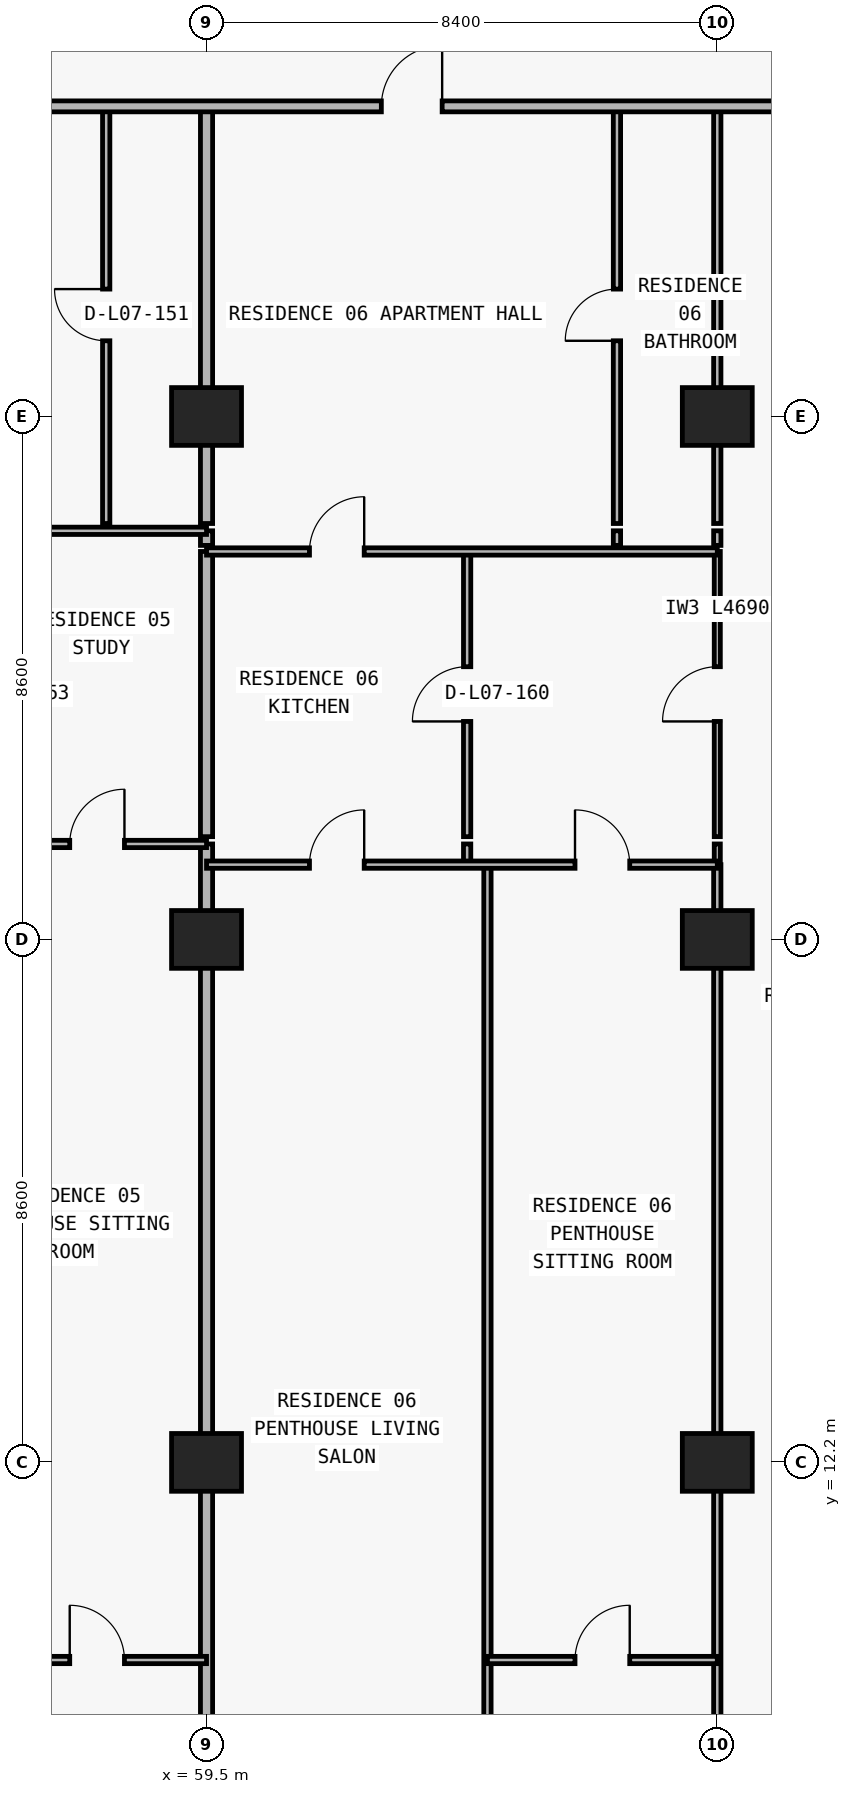
"""IFC4 building model, lengths in metres.
Left out: names, types, materials, properties, quantities, classifications, styles, units other than length and angle.
Written with IfcOpenShell. Run it as: python <this file> out.ifc"""

import sys

from ifc_helpers import new_model, si_unit, direction, frame, frame_2d, origin, origin_2d, place, context, subcontext, project, spatial, rectangle, extrude, element, fill, save


model = new_model("IFC4")
c1 = context("Model", 3, precision=1e-05, world=origin(), true_north=direction((0.0, 1.0)))
c2 = subcontext(c1, "Body", "Model", "MODEL_VIEW")
j1 = project(units=[si_unit("LENGTHUNIT", "METRE"), si_unit("PLANEANGLEUNIT", "RADIAN")], contexts=[c1])
p1 = place(None, origin())
s1 = spatial("IfcSite", under=j1, at=p1, CompositionType="ELEMENT")
p2 = place(p1, origin())
s2 = spatial("IfcBuilding", under=s1, at=p2, CompositionType="ELEMENT")
p3 = place(p2, frame((0.0, 0.0, 33.3)))
s3 = spatial("IfcBuildingStorey", under=s2, at=p3, CompositionType="ELEMENT", Elevation=33.3)
for number, where, z_axis, x_axis in (
    (1, (59.5, 12.2, 0.0), (0.0, 0.0, 1.0), (1.0, 0.0, 0.0)),
    (2, (67.9, 12.2, 0.0), (0.0, 0.0, 1.0), (1.0, 0.0, 0.0)),
    (3, (59.5, 20.8, 0.0), (0.0, 0.0, 1.0), (1.0, 0.0, 0.0)),
    (4, (67.9, 20.8, 0.0), (0.0, 0.0, 1.0), (1.0, 0.0, 0.0)),
    (5, (59.5, 29.4, 0.0), (0.0, 0.0, 1.0), (1.0, 0.0, 0.0)),
    (6, (67.9, 29.4, 0.0), (0.0, 0.0, 1.0), (1.0, 0.0, 0.0)),
):
    element("IfcColumn", number, at=place(p3, frame(where, z_axis=z_axis, x_axis=x_axis)), inside=s3, PredefinedType="COLUMN", context=c2, shape_type="SweptSolid", body=[
        extrude(rectangle(XDim=1.15, YDim=0.95, at=origin_2d()), origin(), (0.0, 0.0, 1.0), 3.05),
    ])
p4 = place(p3, frame((57.85, 27.64, 0.0), z_axis=(0.0, 0.0, 1.0), x_axis=(0.0, 1.0, 0.0)))
e7 = element("IfcWall", 7, at=p4, inside=s3, PredefinedType="PARTITIONING", context=c2, shape_type="SweptSolid", body=[
    extrude(rectangle(XDim=6.86, YDim=0.12, at=frame_2d((3.43, 0.0))), origin(), (0.0, 0.0, 1.0), 3.05),
])
p5 = place(p4, frame((3.005, 0.0, 0.0)))
e8 = element("IfcOpeningElement", 8, at=p5, cuts=e7, PredefinedType="OPENING", context=c2, shape_type="SweptSolid", body=[
    extrude(rectangle(XDim=0.85, YDim=2.1, at=frame_2d((0.425, 1.05))), frame((0.0, 0.07, 0.0), z_axis=(0.0, -1.0, 0.0), x_axis=(1.0, 0.0, 0.0)), (0.0, 0.0, 1.0), 0.14),
])
p6 = place(p3, frame((59.5, 6.24, 0.0), z_axis=(0.0, 0.0, 1.0), x_axis=(0.0, 1.0, 0.0)))
e9 = element("IfcWall", 9, at=p6, inside=s3, PredefinedType="PARTITIONING", context=c2, shape_type="SweptSolid", body=[
    extrude(rectangle(XDim=16.13, YDim=0.2, at=frame_2d((8.065, 0.0))), origin(), (0.0, 0.0, 1.0), 2.11),
])
p7 = place(p3, frame((59.5, 22.49, 0.0), z_axis=(0.0, 0.0, 1.0), x_axis=(0.0, 1.0, 0.0)))
e10 = element("IfcWall", 10, at=p7, inside=s3, PredefinedType="PARTITIONING", context=c2, shape_type="SweptSolid", body=[
    extrude(rectangle(XDim=4.69, YDim=0.2, at=frame_2d((2.345, 0.0))), origin(), (0.0, 0.0, 1.0), 2.11),
])
p8 = place(p3, frame((59.5, 27.28, 0.0), z_axis=(0.0, 0.0, 1.0), x_axis=(0.0, 1.0, 0.0)))
e11 = element("IfcWall", 11, at=p8, inside=s3, PredefinedType="PARTITIONING", context=c2, shape_type="SweptSolid", body=[
    extrude(rectangle(XDim=0.24, YDim=0.2, at=frame_2d((0.12, 0.0))), origin(), (0.0, 0.0, 1.0), 2.11),
])
p9 = place(p3, frame((59.5, 27.64, 0.0), z_axis=(0.0, 0.0, 1.0), x_axis=(0.0, 1.0, 0.0)))
e12 = element("IfcWall", 12, at=p9, inside=s3, PredefinedType="PARTITIONING", context=c2, shape_type="SweptSolid", body=[
    extrude(rectangle(XDim=6.86, YDim=0.2, at=frame_2d((3.43, 0.0))), origin(), (0.0, 0.0, 1.0), 2.11),
])
p10 = place(p3, frame((63.786, 22.03, 0.0), z_axis=(0.0, 0.0, 1.0), x_axis=(0.0, 1.0, 0.0)))
e13 = element("IfcWall", 13, at=p10, inside=s3, PredefinedType="PARTITIONING", context=c2, shape_type="SweptSolid", body=[
    extrude(rectangle(XDim=0.34, YDim=0.12, at=frame_2d((0.17, 0.0))), origin(), (0.0, 0.0, 1.0), 3.05),
])
p11 = place(p3, frame((63.786, 22.49, 0.0), z_axis=(0.0, 0.0, 1.0), x_axis=(0.0, 1.0, 0.0)))
e14 = element("IfcWall", 14, at=p11, inside=s3, PredefinedType="PARTITIONING", context=c2, shape_type="SweptSolid", body=[
    extrude(rectangle(XDim=4.69, YDim=0.12, at=frame_2d((2.345, 0.0))), origin(), (0.0, 0.0, 1.0), 3.05),
])
p12 = place(p11, frame((1.895, 0.0, 0.0)))
e15 = element("IfcOpeningElement", 15, at=p12, cuts=e14, PredefinedType="OPENING", context=c2, shape_type="SweptSolid", body=[
    extrude(rectangle(XDim=0.9, YDim=2.15, at=frame_2d((0.45, 1.075))), frame((0.0, 0.07, 0.0), z_axis=(0.0, -1.0, 0.0), x_axis=(1.0, 0.0, 0.0)), (0.0, 0.0, 1.0), 0.14),
])
p13 = place(p3, frame((64.12, 6.24, 0.0), z_axis=(0.0, 0.0, 1.0), x_axis=(0.0, 1.0, 0.0)))
e16 = element("IfcWall", 16, at=p13, inside=s3, PredefinedType="PARTITIONING", context=c2, shape_type="SweptSolid", body=[
    extrude(rectangle(XDim=15.79, YDim=0.12, at=frame_2d((7.895, 0.0))), origin(), (0.0, 0.0, 1.0), 3.05),
])
p14 = place(p3, frame((66.25, 27.28, 0.0), z_axis=(0.0, 0.0, 1.0), x_axis=(0.0, 1.0, 0.0)))
e17 = element("IfcWall", 17, at=p14, inside=s3, PredefinedType="PARTITIONING", context=c2, shape_type="SweptSolid", body=[
    extrude(rectangle(XDim=0.24, YDim=0.12, at=frame_2d((0.12, 0.0))), origin(), (0.0, 0.0, 1.0), 3.05),
])
p15 = place(p3, frame((66.25, 27.64, 0.0), z_axis=(0.0, 0.0, 1.0), x_axis=(0.0, 1.0, 0.0)))
e18 = element("IfcWall", 18, at=p15, inside=s3, PredefinedType="PARTITIONING", context=c2, shape_type="SweptSolid", body=[
    extrude(rectangle(XDim=6.86, YDim=0.12, at=frame_2d((3.43, 0.0))), origin(), (0.0, 0.0, 1.0), 3.05),
])
p16 = place(p15, frame((3.005, 0.0, 0.0)))
e19 = element("IfcOpeningElement", 19, at=p16, cuts=e18, PredefinedType="OPENING", context=c2, shape_type="SweptSolid", body=[
    extrude(rectangle(XDim=0.85, YDim=2.1, at=frame_2d((0.425, 1.05))), frame((0.0, 0.07, 0.0), z_axis=(0.0, -1.0, 0.0), x_axis=(1.0, 0.0, 0.0)), (0.0, 0.0, 1.0), 0.14),
])
p17 = place(p3, frame((67.9, 6.24, 0.0), z_axis=(0.0, 0.0, 1.0), x_axis=(0.0, 1.0, 0.0)))
e20 = element("IfcWall", 20, at=p17, inside=s3, PredefinedType="PARTITIONING", context=c2, shape_type="SweptSolid", body=[
    extrude(rectangle(XDim=15.79, YDim=0.12, at=frame_2d((7.895, 0.0))), origin(), (0.0, 0.0, 1.0), 2.11),
])
p18 = place(p3, frame((67.9, 22.035, 0.0), z_axis=(0.0, 0.0, 1.0), x_axis=(0.0, 1.0, 0.0)))
e21 = element("IfcWall", 21, at=p18, inside=s3, PredefinedType="MOVABLE", context=c2, shape_type="SweptSolid", body=[
    extrude(rectangle(XDim=0.335, YDim=0.1, at=frame_2d((0.167, 0.0))), origin(), (0.0, 0.0, 1.0), 2.11),
])
p19 = place(p3, frame((67.9, 22.49, 0.0), z_axis=(0.0, 0.0, 1.0), x_axis=(0.0, 1.0, 0.0)))
e22 = element("IfcWall", 22, at=p19, inside=s3, PredefinedType="MOVABLE", context=c2, shape_type="SweptSolid", body=[
    extrude(rectangle(XDim=4.69, YDim=0.1, at=frame_2d((2.345, 0.0))), origin(), (0.0, 0.0, 1.0), 2.11),
])
p20 = place(p19, frame((1.895, 0.0, 0.0)))
e23 = element("IfcOpeningElement", 23, at=p20, cuts=e22, PredefinedType="OPENING", context=c2, shape_type="SweptSolid", body=[
    extrude(rectangle(XDim=0.9, YDim=2.06, at=frame_2d((0.45, 1.03))), frame((0.0, 0.06, 0.0), z_axis=(0.0, -1.0, 0.0), x_axis=(1.0, 0.0, 0.0)), (0.0, 0.0, 1.0), 0.12),
])
p21 = place(p3, frame((67.9, 27.28, 0.0), z_axis=(0.0, 0.0, 1.0), x_axis=(0.0, 1.0, 0.0)))
e24 = element("IfcWall", 24, at=p21, inside=s3, PredefinedType="PARTITIONING", context=c2, shape_type="SweptSolid", body=[
    extrude(rectangle(XDim=0.24, YDim=0.12, at=frame_2d((0.12, 0.0))), origin(), (0.0, 0.0, 1.0), 2.11),
])
p22 = place(p3, frame((67.9, 27.64, 0.0), z_axis=(0.0, 0.0, 1.0), x_axis=(0.0, 1.0, 0.0)))
e25 = element("IfcWall", 25, at=p22, inside=s3, PredefinedType="PARTITIONING", context=c2, shape_type="SweptSolid", body=[
    extrude(rectangle(XDim=6.86, YDim=0.12, at=frame_2d((3.43, 0.0))), origin(), (0.0, 0.0, 1.0), 2.11),
])
p23 = place(p3, frame((55.9, 8.95, 0.0), z_axis=(0.0, 0.0, 1.0), x_axis=(1.0, 0.0, 0.0)))
e26 = element("IfcWall", 26, at=p23, inside=s3, PredefinedType="PARTITIONING", context=c2, shape_type="SweptSolid", body=[
    extrude(rectangle(XDim=3.6, YDim=0.12, at=frame_2d((1.8, 0.0))), origin(), (0.0, 0.0, 1.0), 3.05),
])
p24 = place(p23, frame((1.35, 0.0, 0.0)))
e27 = element("IfcOpeningElement", 27, at=p24, cuts=e26, PredefinedType="OPENING", context=c2, shape_type="SweptSolid", body=[
    extrude(rectangle(XDim=0.9, YDim=2.15, at=frame_2d((0.45, 1.075))), frame((0.0, 0.07, 0.0), z_axis=(0.0, -1.0, 0.0), x_axis=(1.0, 0.0, 0.0)), (0.0, 0.0, 1.0), 0.14),
])
p25 = place(p3, frame((64.12, 8.95, 0.0), z_axis=(0.0, 0.0, 1.0), x_axis=(1.0, 0.0, 0.0)))
e28 = element("IfcWall", 28, at=p25, inside=s3, PredefinedType="PARTITIONING", context=c2, shape_type="SweptSolid", body=[
    extrude(rectangle(XDim=3.78, YDim=0.12, at=frame_2d((1.89, 0.0))), origin(), (0.0, 0.0, 1.0), 3.05),
])
p26 = place(p25, frame((1.44, 0.0, 0.0)))
e29 = element("IfcOpeningElement", 29, at=p26, cuts=e28, PredefinedType="OPENING", context=c2, shape_type="SweptSolid", body=[
    extrude(rectangle(XDim=0.9, YDim=2.15, at=frame_2d((0.45, 1.075))), frame((0.0, 0.07, 0.0), z_axis=(0.0, -1.0, 0.0), x_axis=(1.0, 0.0, 0.0)), (0.0, 0.0, 1.0), 0.14),
])
p27 = place(p3, frame((59.5, 22.03, 0.0), z_axis=(0.0, 0.0, 1.0), x_axis=(1.0, 0.0, 0.0)))
e30 = element("IfcWall", 30, at=p27, inside=s3, PredefinedType="PARTITIONING", context=c2, shape_type="SweptSolid", body=[
    extrude(rectangle(XDim=8.4, YDim=0.12, at=frame_2d((4.2, 0.0))), origin(), (0.0, 0.0, 1.0), 3.05),
])
p28 = place(p27, frame((1.693, 0.0, 0.0)))
e31 = element("IfcOpeningElement", 31, at=p28, cuts=e30, PredefinedType="OPENING", context=c2, shape_type="SweptSolid", body=[
    extrude(rectangle(XDim=0.9, YDim=2.15, at=frame_2d((0.45, 1.075))), frame((0.0, 0.07, 0.0), z_axis=(0.0, -1.0, 0.0), x_axis=(1.0, 0.0, 0.0)), (0.0, 0.0, 1.0), 0.14),
])
p29 = place(p27, frame((6.06, 0.0, 0.0)))
e32 = element("IfcOpeningElement", 32, at=p29, cuts=e30, PredefinedType="OPENING", context=c2, shape_type="SweptSolid", body=[
    extrude(rectangle(XDim=0.9, YDim=2.15, at=frame_2d((0.45, 1.075))), frame((0.0, 0.07, 0.0), z_axis=(0.0, -1.0, 0.0), x_axis=(1.0, 0.0, 0.0)), (0.0, 0.0, 1.0), 0.14),
])
p30 = place(p3, frame((55.9, 22.37, 0.0), z_axis=(0.0, 0.0, 1.0), x_axis=(1.0, 0.0, 0.0)))
e33 = element("IfcWall", 33, at=p30, inside=s3, PredefinedType="PARTITIONING", context=c2, shape_type="SweptSolid", body=[
    extrude(rectangle(XDim=3.6, YDim=0.12, at=frame_2d((1.8, 0.0))), origin(), (0.0, 0.0, 1.0), 3.05),
])
p31 = place(p30, frame((1.35, 0.0, 0.0)))
e34 = element("IfcOpeningElement", 34, at=p31, cuts=e33, PredefinedType="OPENING", context=c2, shape_type="SweptSolid", body=[
    extrude(rectangle(XDim=0.9, YDim=2.15, at=frame_2d((0.45, 1.075))), frame((0.0, 0.07, 0.0), z_axis=(0.0, -1.0, 0.0), x_axis=(1.0, 0.0, 0.0)), (0.0, 0.0, 1.0), 0.14),
])
p32 = place(p3, frame((59.5, 27.18, 0.0), z_axis=(0.0, 0.0, 1.0), x_axis=(1.0, 0.0, 0.0)))
e35 = element("IfcWall", 35, at=p32, inside=s3, PredefinedType="PARTITIONING", context=c2, shape_type="SweptSolid", body=[
    extrude(rectangle(XDim=8.4, YDim=0.12, at=frame_2d((4.2, 0.0))), origin(), (0.0, 0.0, 1.0), 3.05),
])
p33 = place(p32, frame((1.693, 0.0, 0.0)))
e36 = element("IfcOpeningElement", 36, at=p33, cuts=e35, PredefinedType="OPENING", context=c2, shape_type="SweptSolid", body=[
    extrude(rectangle(XDim=0.9, YDim=2.15, at=frame_2d((0.45, 1.075))), frame((0.0, 0.07, 0.0), z_axis=(0.0, -1.0, 0.0), x_axis=(1.0, 0.0, 0.0)), (0.0, 0.0, 1.0), 0.14),
])
p34 = place(p3, frame((55.9, 27.52, 0.0), z_axis=(0.0, 0.0, 1.0), x_axis=(1.0, 0.0, 0.0)))
e37 = element("IfcWall", 37, at=p34, inside=s3, PredefinedType="PARTITIONING", context=c2, shape_type="SweptSolid", body=[
    extrude(rectangle(XDim=3.6, YDim=0.12, at=frame_2d((1.8, 0.0))), origin(), (0.0, 0.0, 1.0), 3.05),
])
p35 = place(p3, frame((55.9, 34.5, 0.0), z_axis=(0.0, 0.0, 1.0), x_axis=(1.0, 0.0, 0.0)))
e38 = element("IfcWall", 38, at=p35, inside=s3, PredefinedType="PARTITIONING", context=c2, shape_type="SweptSolid", body=[
    extrude(rectangle(XDim=16.8, YDim=0.18, at=frame_2d((8.4, 0.0))), origin(), (0.0, 0.0, 1.0), 3.05),
])
p36 = place(p35, frame((6.475, 0.0, 0.0)))
e39 = element("IfcOpeningElement", 39, at=p36, cuts=e38, PredefinedType="OPENING", context=c2, shape_type="SweptSolid", body=[
    extrude(rectangle(XDim=1.0, YDim=2.2, at=frame_2d((0.5, 1.1))), frame((0.0, 0.1, 0.0), z_axis=(0.0, -1.0, 0.0), x_axis=(1.0, 0.0, 0.0)), (0.0, 0.0, 1.0), 0.2),
])
p37 = place(p5, origin())
e40 = element("IfcDoor", 40, at=p37, inside=s3, OperationType="SINGLE_SWING_RIGHT", PredefinedType="DOOR", context=c2, shape_type="SweptSolid", body=[
    extrude(rectangle(XDim=0.85, YDim=2.1, at=frame_2d((0.425, 1.05))), frame((0.0, 0.025, 0.0), z_axis=(0.0, -1.0, 0.0), x_axis=(1.0, 0.0, 0.0)), (0.0, 0.0, 1.0), 0.05),
])
fill(e8, e40)
p38 = place(p31, origin())
e41 = element("IfcDoor", 41, at=p38, inside=s3, OperationType="SINGLE_SWING_RIGHT", PredefinedType="DOOR", context=c2, shape_type="SweptSolid", body=[
    extrude(rectangle(XDim=0.9, YDim=2.15, at=frame_2d((0.45, 1.075))), frame((0.0, 0.025, 0.0), z_axis=(0.0, -1.0, 0.0), x_axis=(1.0, 0.0, 0.0)), (0.0, 0.0, 1.0), 0.05),
])
fill(e34, e41)
p39 = place(p24, origin())
e42 = element("IfcDoor", 42, at=p39, inside=s3, OperationType="SINGLE_SWING_LEFT", PredefinedType="DOOR", context=c2, shape_type="SweptSolid", body=[
    extrude(rectangle(XDim=0.9, YDim=2.15, at=frame_2d((0.45, 1.075))), frame((0.0, 0.025, 0.0), z_axis=(0.0, -1.0, 0.0), x_axis=(1.0, 0.0, 0.0)), (0.0, 0.0, 1.0), 0.05),
])
fill(e27, e42)
p40 = place(p36, origin())
e43 = element("IfcDoor", 43, at=p40, inside=s3, OperationType="SINGLE_SWING_RIGHT", PredefinedType="DOOR", context=c2, shape_type="SweptSolid", body=[
    extrude(rectangle(XDim=1.0, YDim=2.2, at=frame_2d((0.5, 1.1))), frame((0.0, 0.025, 0.0), z_axis=(0.0, -1.0, 0.0), x_axis=(1.0, 0.0, 0.0)), (0.0, 0.0, 1.0), 0.05),
])
fill(e39, e43)
p41 = place(p16, origin())
e44 = element("IfcDoor", 44, at=p41, inside=s3, OperationType="SINGLE_SWING_LEFT", PredefinedType="DOOR", context=c2, shape_type="SweptSolid", body=[
    extrude(rectangle(XDim=0.85, YDim=2.1, at=frame_2d((0.425, 1.05))), frame((0.0, 0.025, 0.0), z_axis=(0.0, -1.0, 0.0), x_axis=(1.0, 0.0, 0.0)), (0.0, 0.0, 1.0), 0.05),
])
fill(e19, e44)
p42 = place(p33, origin())
e45 = element("IfcDoor", 45, at=p42, inside=s3, OperationType="SINGLE_SWING_RIGHT", PredefinedType="DOOR", context=c2, shape_type="SweptSolid", body=[
    extrude(rectangle(XDim=0.9, YDim=2.15, at=frame_2d((0.45, 1.075))), frame((0.0, 0.025, 0.0), z_axis=(0.0, -1.0, 0.0), x_axis=(1.0, 0.0, 0.0)), (0.0, 0.0, 1.0), 0.05),
])
fill(e36, e45)
p43 = place(p12, origin())
e46 = element("IfcDoor", 46, at=p43, inside=s3, OperationType="SINGLE_SWING_LEFT", PredefinedType="DOOR", context=c2, shape_type="SweptSolid", body=[
    extrude(rectangle(XDim=0.9, YDim=2.15, at=frame_2d((0.45, 1.075))), frame((0.0, 0.025, 0.0), z_axis=(0.0, -1.0, 0.0), x_axis=(1.0, 0.0, 0.0)), (0.0, 0.0, 1.0), 0.05),
])
fill(e15, e46)
p44 = place(p28, origin())
e47 = element("IfcDoor", 47, at=p44, inside=s3, OperationType="SINGLE_SWING_RIGHT", PredefinedType="DOOR", context=c2, shape_type="SweptSolid", body=[
    extrude(rectangle(XDim=0.9, YDim=2.15, at=frame_2d((0.45, 1.075))), frame((0.0, 0.025, 0.0), z_axis=(0.0, -1.0, 0.0), x_axis=(1.0, 0.0, 0.0)), (0.0, 0.0, 1.0), 0.05),
])
fill(e31, e47)
p45 = place(p29, origin())
e48 = element("IfcDoor", 48, at=p45, inside=s3, OperationType="SINGLE_SWING_LEFT", PredefinedType="DOOR", context=c2, shape_type="SweptSolid", body=[
    extrude(rectangle(XDim=0.9, YDim=2.15, at=frame_2d((0.45, 1.075))), frame((0.0, 0.025, 0.0), z_axis=(0.0, -1.0, 0.0), x_axis=(1.0, 0.0, 0.0)), (0.0, 0.0, 1.0), 0.05),
])
fill(e32, e48)
p46 = place(p26, origin())
e49 = element("IfcDoor", 49, at=p46, inside=s3, OperationType="SINGLE_SWING_RIGHT", PredefinedType="DOOR", context=c2, shape_type="SweptSolid", body=[
    extrude(rectangle(XDim=0.9, YDim=2.15, at=frame_2d((0.45, 1.075))), frame((0.0, 0.025, 0.0), z_axis=(0.0, -1.0, 0.0), x_axis=(1.0, 0.0, 0.0)), (0.0, 0.0, 1.0), 0.05),
])
fill(e29, e49)
p47 = place(p20, origin())
e50 = element("IfcDoor", 50, at=p47, inside=s3, OperationType="SINGLE_SWING_LEFT", PredefinedType="DOOR", context=c2, shape_type="SweptSolid", body=[
    extrude(rectangle(XDim=0.9, YDim=2.06, at=frame_2d((0.45, 1.03))), frame((0.0, 0.025, 0.0), z_axis=(0.0, -1.0, 0.0), x_axis=(1.0, 0.0, 0.0)), (0.0, 0.0, 1.0), 0.05),
])
fill(e23, e50)
save(model, sys.argv[1])
